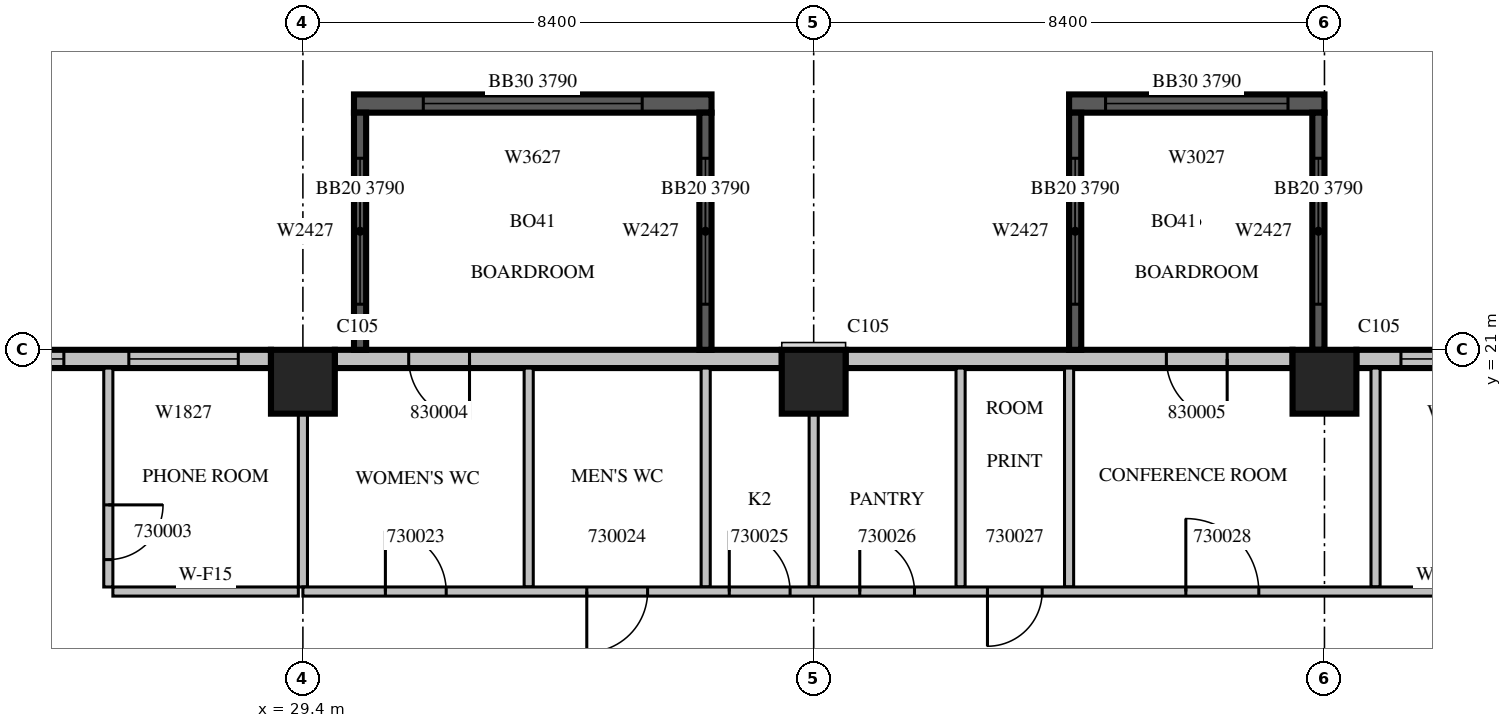
"""IFC4 building model, lengths in metres.
Left out: names, types, materials, properties, quantities, classifications, styles, units other than length and angle.
Written with IfcOpenShell. Run it as: python <this file> out.ifc"""

import sys

from ifc_helpers import new_model, si_unit, direction, frame, frame_2d, origin, origin_2d, place, context, subcontext, project, spatial, rectangle, extrude, source, transform, mapped, element, fill, save


model = new_model("IFC4")
c1 = context("Model", 3, precision=1e-05, world=origin(), true_north=direction((0.0, 1.0)))
c2 = subcontext(c1, "Body", "Model", "MODEL_VIEW")
j1 = project(units=[si_unit("LENGTHUNIT", "METRE"), si_unit("PLANEANGLEUNIT", "RADIAN")], contexts=[c1])
p1 = place(None, origin())
s1 = spatial("IfcSite", under=j1, at=p1, CompositionType="ELEMENT")
p2 = place(p1, origin())
s2 = spatial("IfcBuilding", under=s1, at=p2, CompositionType="ELEMENT")
p3 = place(p2, frame((0.0, 0.0, 137.1)))
s3 = spatial("IfcBuildingStorey", under=s2, at=p3, CompositionType="ELEMENT", Elevation=137.1)
m1 = source(origin(), c2, "Body", "SweptSolid", [
    extrude(rectangle(XDim=1.05, YDim=1.05, at=origin_2d()), origin(), (0.0, 0.0, 1.0), 4.2),
])
for number, where, z_axis, x_axis in (
    (1, (29.4, 20.475, 0.0), (0.0, 0.0, 1.0), (1.0, 0.0, 0.0)),
    (2, (37.8, 20.475, 0.0), (0.0, 0.0, 1.0), (1.0, 0.0, 0.0)),
    (3, (46.2, 20.475, 0.0), (0.0, 0.0, 1.0), (1.0, 0.0, 0.0)),
):
    element("IfcColumn", number, at=place(p3, frame(where, z_axis=z_axis, x_axis=x_axis)), inside=s3, PredefinedType="COLUMN", context=c2, shape_type="MappedRepresentation", body=[
        mapped(m1, transform((0.0, 0.0, 0.0), scale=1.0)),
    ])
m2 = source(origin(), c2, "Body", "SweptSolid", [
    extrude(rectangle(XDim=4.83, YDim=0.3, at=frame_2d((2.415, 0.0))), origin(), (0.0, 0.0, 1.0), 3.8),
])
p4 = place(p3, frame((51.555, 20.85, 0.0), z_axis=(0.0, 0.0, 1.0), x_axis=(-1.0, 0.0, 0.0)))
e4 = element("IfcWall", 4, at=p4, inside=s3, PredefinedType="STANDARD", context=c2, shape_type="MappedRepresentation", body=[
    mapped(m2, transform((0.0, 0.0, 0.0), scale=1.0)),
])
m3 = source(origin(), c2, "Body", "SweptSolid", [
    extrude(rectangle(XDim=1.8, YDim=2.7, at=frame_2d((0.9, 1.35))), frame((0.0, 0.16, 0.0), z_axis=(0.0, -1.0, 0.0), x_axis=(1.0, 0.0, 0.0)), (0.0, 0.0, 1.0), 0.32),
])
p5 = place(p4, frame((2.297, 0.0, 0.6)))
e5 = element("IfcOpeningElement", 5, at=p5, cuts=e4, PredefinedType="OPENING", context=c2, shape_type="MappedRepresentation", body=[
    mapped(m3, transform((0.0, 0.0, 0.0), scale=1.0)),
])
m4 = source(origin(), c2, "Body", "SweptSolid", [
    extrude(rectangle(XDim=7.35, YDim=0.3, at=frame_2d((3.675, 0.0))), origin(), (0.0, 0.0, 1.0), 3.8),
])
p6 = place(p3, frame((45.675, 20.85, 0.0), z_axis=(0.0, 0.0, 1.0), x_axis=(-1.0, 0.0, 0.0)))
e6 = element("IfcWall", 6, at=p6, inside=s3, PredefinedType="STANDARD", context=c2, shape_type="MappedRepresentation", body=[
    mapped(m4, transform((0.0, 0.0, 0.0), scale=1.0)),
])
m5 = source(origin(), c2, "Body", "SweptSolid", [
    extrude(rectangle(XDim=1.0, YDim=2.1, at=frame_2d((0.5, 1.05))), frame((0.0, 0.16, 0.0), z_axis=(0.0, -1.0, 0.0), x_axis=(1.0, 0.0, 0.0)), (0.0, 0.0, 1.0), 0.32),
])
p7 = place(p6, frame((1.075, 0.0, 0.0)))
e7 = element("IfcOpeningElement", 7, at=p7, cuts=e6, PredefinedType="OPENING", context=c2, shape_type="MappedRepresentation", body=[
    mapped(m5, transform((0.0, 0.0, 0.0), scale=1.0)),
])
p8 = place(p3, frame((37.275, 20.85, 0.0), z_axis=(0.0, 0.0, 1.0), x_axis=(-1.0, 0.0, 0.0)))
e8 = element("IfcWall", 8, at=p8, inside=s3, PredefinedType="STANDARD", context=c2, shape_type="MappedRepresentation", body=[
    mapped(m4, transform((0.0, 0.0, 0.0), scale=1.0)),
])
p9 = place(p8, frame((5.135, 0.0, 0.0)))
e9 = element("IfcOpeningElement", 9, at=p9, cuts=e8, PredefinedType="OPENING", context=c2, shape_type="MappedRepresentation", body=[
    mapped(m5, transform((0.0, 0.0, 0.0), scale=1.0)),
])
m6 = source(origin(), c2, "Body", "SweptSolid", [
    extrude(rectangle(XDim=6.875, YDim=0.3, at=frame_2d((3.438, 0.0))), origin(), (0.0, 0.0, 1.0), 3.8),
])
p10 = place(p3, frame((28.875, 20.85, 0.0), z_axis=(0.0, 0.0, 1.0), x_axis=(-1.0, 0.0, 0.0)))
e10 = element("IfcWall", 10, at=p10, inside=s3, PredefinedType="STANDARD", context=c2, shape_type="MappedRepresentation", body=[
    mapped(m6, transform((0.0, 0.0, 0.0), scale=1.0)),
])
p11 = place(p10, frame((0.537, 0.0, 0.6)))
e11 = element("IfcOpeningElement", 11, at=p11, cuts=e10, PredefinedType="OPENING", context=c2, shape_type="MappedRepresentation", body=[
    mapped(m3, transform((0.0, 0.0, 0.0), scale=1.0)),
])
m7 = source(origin(), c2, "Body", "SweptSolid", [
    extrude(rectangle(XDim=2.4, YDim=2.7, at=frame_2d((1.2, 1.35))), frame((0.0, 0.16, 0.0), z_axis=(0.0, -1.0, 0.0), x_axis=(1.0, 0.0, 0.0)), (0.0, 0.0, 1.0), 0.32),
])
p12 = place(p10, frame((3.406, 0.0, 0.6)))
e12 = element("IfcOpeningElement", 12, at=p12, cuts=e10, PredefinedType="OPENING", context=c2, shape_type="MappedRepresentation", body=[
    mapped(m7, transform((0.0, 0.0, 0.0), scale=1.0)),
])
m8 = source(origin(), c2, "Body", "SweptSolid", [
    extrude(rectangle(XDim=5.88, YDim=0.3, at=frame_2d((2.94, 0.0))), origin(), (0.0, 0.0, 1.0), 3.79),
])
p13 = place(p3, frame((36.12, 25.05, 0.0), z_axis=(0.0, 0.0, 1.0), x_axis=(-1.0, 0.0, 0.0)))
e13 = element("IfcWall", 13, at=p13, inside=s3, PredefinedType="SOLIDWALL", context=c2, shape_type="MappedRepresentation", body=[
    mapped(m8, transform((0.0, 0.0, 0.0), scale=1.0)),
])
m9 = source(origin(), c2, "Body", "SweptSolid", [
    extrude(rectangle(XDim=3.6, YDim=2.7, at=frame_2d((1.8, 1.35))), frame((0.0, 0.16, 0.0), z_axis=(0.0, -1.0, 0.0), x_axis=(1.0, 0.0, 0.0)), (0.0, 0.0, 1.0), 0.32),
])
p14 = place(p13, frame((1.14, 0.0, 0.6)))
e14 = element("IfcOpeningElement", 14, at=p14, cuts=e13, PredefinedType="OPENING", context=c2, shape_type="MappedRepresentation", body=[
    mapped(m9, transform((0.0, 0.0, 0.0), scale=1.0)),
])
m10 = source(origin(), c2, "Body", "SweptSolid", [
    extrude(rectangle(XDim=3.9, YDim=0.2, at=frame_2d((1.95, 0.0))), origin(), (0.0, 0.0, 1.0), 3.79),
])
p15 = place(p3, frame((36.02, 21.0, 0.0), z_axis=(0.0, 0.0, 1.0), x_axis=(0.0, 1.0, 0.0)))
e15 = element("IfcWall", 15, at=p15, inside=s3, PredefinedType="SOLIDWALL", context=c2, shape_type="MappedRepresentation", body=[
    mapped(m10, transform((0.0, 0.0, 0.0), scale=1.0)),
])
m11 = source(origin(), c2, "Body", "SweptSolid", [
    extrude(rectangle(XDim=2.4, YDim=2.7, at=frame_2d((1.2, 1.35))), frame((0.0, 0.11, 0.0), z_axis=(0.0, -1.0, 0.0), x_axis=(1.0, 0.0, 0.0)), (0.0, 0.0, 1.0), 0.22),
])
p16 = place(p15, frame((0.75, 0.0, 0.6)))
e16 = element("IfcOpeningElement", 16, at=p16, cuts=e15, PredefinedType="OPENING", context=c2, shape_type="MappedRepresentation", body=[
    mapped(m11, transform((0.0, 0.0, 0.0), scale=1.0)),
])
p17 = place(p3, frame((30.34, 21.0, 0.0), z_axis=(0.0, 0.0, 1.0), x_axis=(0.0, 1.0, 0.0)))
e17 = element("IfcWall", 17, at=p17, inside=s3, PredefinedType="SOLIDWALL", context=c2, shape_type="MappedRepresentation", body=[
    mapped(m10, transform((0.0, 0.0, 0.0), scale=1.0)),
])
p18 = place(p17, frame((0.75, 0.0, 0.6)))
e18 = element("IfcOpeningElement", 18, at=p18, cuts=e17, PredefinedType="OPENING", context=c2, shape_type="MappedRepresentation", body=[
    mapped(m11, transform((0.0, 0.0, 0.0), scale=1.0)),
])
m12 = source(origin(), c2, "Body", "SweptSolid", [
    extrude(rectangle(XDim=4.2, YDim=0.3, at=frame_2d((2.1, 0.0))), origin(), (0.0, 0.0, 1.0), 3.79),
])
p19 = place(p3, frame((46.2, 25.05, 0.0), z_axis=(0.0, 0.0, 1.0), x_axis=(-1.0, 0.0, 0.0)))
e19 = element("IfcWall", 19, at=p19, inside=s3, PredefinedType="SOLIDWALL", context=c2, shape_type="MappedRepresentation", body=[
    mapped(m12, transform((0.0, 0.0, 0.0), scale=1.0)),
])
m13 = source(origin(), c2, "Body", "SweptSolid", [
    extrude(rectangle(XDim=3.0, YDim=2.7, at=frame_2d((1.5, 1.35))), frame((0.0, 0.16, 0.0), z_axis=(0.0, -1.0, 0.0), x_axis=(1.0, 0.0, 0.0)), (0.0, 0.0, 1.0), 0.32),
])
p20 = place(p19, frame((0.6, 0.0, 0.6)))
e20 = element("IfcOpeningElement", 20, at=p20, cuts=e19, PredefinedType="OPENING", context=c2, shape_type="MappedRepresentation", body=[
    mapped(m13, transform((0.0, 0.0, 0.0), scale=1.0)),
])
p21 = place(p3, frame((46.1, 21.0, 0.0), z_axis=(0.0, 0.0, 1.0), x_axis=(0.0, 1.0, 0.0)))
e21 = element("IfcWall", 21, at=p21, inside=s3, PredefinedType="SOLIDWALL", context=c2, shape_type="MappedRepresentation", body=[
    mapped(m10, transform((0.0, 0.0, 0.0), scale=1.0)),
])
p22 = place(p21, frame((0.75, 0.0, 0.6)))
e22 = element("IfcOpeningElement", 22, at=p22, cuts=e21, PredefinedType="OPENING", context=c2, shape_type="MappedRepresentation", body=[
    mapped(m11, transform((0.0, 0.0, 0.0), scale=1.0)),
])
p23 = place(p3, frame((42.1, 21.0, 0.0), z_axis=(0.0, 0.0, 1.0), x_axis=(0.0, 1.0, 0.0)))
e23 = element("IfcWall", 23, at=p23, inside=s3, PredefinedType="SOLIDWALL", context=c2, shape_type="MappedRepresentation", body=[
    mapped(m10, transform((0.0, 0.0, 0.0), scale=1.0)),
])
p24 = place(p23, frame((0.75, 0.0, 0.6)))
e24 = element("IfcOpeningElement", 24, at=p24, cuts=e23, PredefinedType="OPENING", context=c2, shape_type="MappedRepresentation", body=[
    mapped(m11, transform((0.0, 0.0, 0.0), scale=1.0)),
])
m14 = source(origin(), c2, "Body", "SweptSolid", [
    extrude(rectangle(XDim=3.6, YDim=0.15, at=frame_2d((1.8, 0.0))), origin(), (0.0, 0.0, 1.0), 3.8),
])
p25 = place(p3, frame((26.2, 20.7, 0.0), z_axis=(0.0, 0.0, 1.0), x_axis=(0.0, -1.0, 0.0)))
e25 = element("IfcWall", 25, at=p25, inside=s3, PredefinedType="PARTITIONING", context=c2, shape_type="MappedRepresentation", body=[
    mapped(m14, transform((0.0, 0.0, 0.0), scale=1.0)),
])
m15 = source(origin(), c2, "Body", "SweptSolid", [
    extrude(rectangle(XDim=0.9, YDim=2.1, at=frame_2d((0.45, 1.05))), frame((0.0, 0.085, 0.0), z_axis=(0.0, -1.0, 0.0), x_axis=(1.0, 0.0, 0.0)), (0.0, 0.0, 1.0), 0.17),
])
p26 = place(p25, frame((2.25, 0.0, 0.0)))
e26 = element("IfcOpeningElement", 26, at=p26, cuts=e25, PredefinedType="OPENING", context=c2, shape_type="MappedRepresentation", body=[
    mapped(m15, transform((0.0, 0.0, 0.0), scale=1.0)),
])
m16 = source(origin(), c2, "Body", "SweptSolid", [
    extrude(rectangle(XDim=3.05, YDim=0.15, at=frame_2d((1.525, 0.0))), origin(), (0.0, 0.0, 1.0), 3.8),
])
p27 = place(p3, frame((26.275, 17.025, 0.0), z_axis=(0.0, 0.0, 1.0), x_axis=(1.0, 0.0, 0.0)))
e27 = element("IfcWall", 27, at=p27, inside=s3, PredefinedType="PARTITIONING", context=c2, shape_type="MappedRepresentation", body=[
    mapped(m16, transform((0.0, 0.0, 0.0), scale=1.0)),
])
m17 = source(origin(), c2, "Body", "SweptSolid", [
    extrude(rectangle(XDim=2.851, YDim=0.15, at=frame_2d((1.425, 0.0))), origin(), (0.0, 0.0, 1.0), 3.8),
])
p28 = place(p3, frame((29.4, 17.1, 0.0), z_axis=(0.0, 0.0, 1.0), x_axis=(0.0, 1.0, 0.0)))
e28 = element("IfcWall", 28, at=p28, inside=s3, PredefinedType="PARTITIONING", context=c2, shape_type="MappedRepresentation", body=[
    mapped(m17, transform((0.0, 0.0, 0.0), scale=1.0)),
])
for number, where, z_axis, x_axis in (
    (29, (33.113, 20.7, 0.0), (0.0, 0.0, 1.0), (0.0, -1.0, 0.0)),
    (30, (36.024, 20.7, 0.0), (0.0, 0.0, 1.0), (0.0, -1.0, 0.0)),
    (31, (40.216, 20.7, 0.0), (0.0, 0.0, 1.0), (0.0, -1.0, 0.0)),
    (32, (47.04, 20.7, 0.0), (0.0, 0.0, 1.0), (0.0, -1.0, 0.0)),
):
    element("IfcWall", number, at=place(p3, frame(where, z_axis=z_axis, x_axis=x_axis)), inside=s3, PredefinedType="PARTITIONING", context=c2, shape_type="MappedRepresentation", body=[
        mapped(m14, transform((0.0, 0.0, 0.0), scale=1.0)),
    ])
p29 = place(p3, frame((37.8, 17.1, 0.0), z_axis=(0.0, 0.0, 1.0), x_axis=(0.0, 1.0, 0.0)))
e33 = element("IfcWall", 33, at=p29, inside=s3, PredefinedType="PARTITIONING", context=c2, shape_type="MappedRepresentation", body=[
    mapped(m17, transform((0.0, 0.0, 0.0), scale=1.0)),
])
p30 = place(p3, frame((42.0, 17.1, 0.0), z_axis=(0.0, 0.0, 1.0), x_axis=(0.0, 1.0, 0.0)))
e34 = element("IfcWall", 34, at=p30, inside=s3, PredefinedType="PARTITIONING", context=c2, shape_type="MappedRepresentation", body=[
    mapped(m14, transform((0.0, 0.0, 0.0), scale=1.0)),
])
m18 = source(origin(), c2, "Body", "SweptSolid", [
    extrude(rectangle(XDim=37.5, YDim=0.15, at=frame_2d((18.75, 0.0))), origin(), (0.0, 0.0, 1.0), 3.8),
])
p31 = place(p3, frame((29.4, 17.025, 0.0), z_axis=(0.0, 0.0, 1.0), x_axis=(1.0, 0.0, 0.0)))
e35 = element("IfcWall", 35, at=p31, inside=s3, PredefinedType="PARTITIONING", context=c2, shape_type="MappedRepresentation", body=[
    mapped(m18, transform((0.0, 0.0, 0.0), scale=1.0)),
])
m19 = source(origin(), c2, "Body", "SweptSolid", [
    extrude(rectangle(XDim=1.0, YDim=2.1, at=frame_2d((0.5, 1.05))), frame((0.0, 0.085, 0.0), z_axis=(0.0, -1.0, 0.0), x_axis=(1.0, 0.0, 0.0)), (0.0, 0.0, 1.0), 0.17),
])
p32 = place(p31, frame((1.357, 0.0, 0.0)))
e36 = element("IfcOpeningElement", 36, at=p32, cuts=e35, PredefinedType="OPENING", context=c2, shape_type="MappedRepresentation", body=[
    mapped(m19, transform((0.0, 0.0, 0.0), scale=1.0)),
])
p33 = place(p31, frame((4.669, 0.0, 0.0)))
e37 = element("IfcOpeningElement", 37, at=p33, cuts=e35, PredefinedType="OPENING", context=c2, shape_type="MappedRepresentation", body=[
    mapped(m19, transform((0.0, 0.0, 0.0), scale=1.0)),
])
p34 = place(p31, frame((7.012, 0.0, 0.0)))
e38 = element("IfcOpeningElement", 38, at=p34, cuts=e35, PredefinedType="OPENING", context=c2, shape_type="MappedRepresentation", body=[
    mapped(m19, transform((0.0, 0.0, 0.0), scale=1.0)),
])
p35 = place(p31, frame((9.158, 0.0, 0.0)))
e39 = element("IfcOpeningElement", 39, at=p35, cuts=e35, PredefinedType="OPENING", context=c2, shape_type="MappedRepresentation", body=[
    mapped(m15, transform((0.0, 0.0, 0.0), scale=1.0)),
])
p36 = place(p31, frame((11.258, 0.0, 0.0)))
e40 = element("IfcOpeningElement", 40, at=p36, cuts=e35, PredefinedType="OPENING", context=c2, shape_type="MappedRepresentation", body=[
    mapped(m15, transform((0.0, 0.0, 0.0), scale=1.0)),
])
m20 = source(origin(), c2, "Body", "SweptSolid", [
    extrude(rectangle(XDim=1.2, YDim=2.1, at=frame_2d((0.6, 1.05))), frame((0.0, 0.085, 0.0), z_axis=(0.0, -1.0, 0.0), x_axis=(1.0, 0.0, 0.0)), (0.0, 0.0, 1.0), 0.17),
])
p37 = place(p31, frame((14.52, 0.0, 0.0)))
e41 = element("IfcOpeningElement", 41, at=p37, cuts=e35, PredefinedType="OPENING", context=c2, shape_type="MappedRepresentation", body=[
    mapped(m20, transform((0.0, 0.0, 0.0), scale=1.0)),
])
p38 = place(p31, frame((19.56, 0.0, 0.0)))
e42 = element("IfcOpeningElement", 42, at=p38, cuts=e35, PredefinedType="OPENING", context=c2, shape_type="MappedRepresentation", body=[
    mapped(m20, transform((0.0, 0.0, 0.0), scale=1.0)),
])
p39 = place(p31, frame((25.804, 0.0, 0.0)))
e43 = element("IfcOpeningElement", 43, at=p39, cuts=e35, PredefinedType="OPENING", context=c2, shape_type="MappedRepresentation", body=[
    mapped(m20, transform((0.0, 0.0, 0.0), scale=1.0)),
])
p40 = place(p31, frame((33.251, 0.0, 0.0)))
e44 = element("IfcOpeningElement", 44, at=p40, cuts=e35, PredefinedType="OPENING", context=c2, shape_type="MappedRepresentation", body=[
    mapped(m20, transform((0.0, 0.0, 0.0), scale=1.0)),
])
m21 = source(origin(), c2, "Body", "SweptSolid", [
    extrude(rectangle(XDim=1.8, YDim=2.7, at=frame_2d((0.9, 1.35))), frame((0.0, 0.03, 0.0), z_axis=(0.0, -1.0, 0.0), x_axis=(1.0, 0.0, 0.0)), (0.0, 0.0, 1.0), 0.06),
])
p41 = place(p5, origin())
e45 = element("IfcWindow", 45, at=p41, inside=s3, PartitioningType="SINGLE_PANEL", PredefinedType="WINDOW", context=c2, shape_type="MappedRepresentation", body=[
    mapped(m21, transform((0.0, 0.0, 0.0), scale=1.0)),
])
fill(e5, e45)
p42 = place(p11, origin())
e46 = element("IfcWindow", 46, at=p42, inside=s3, PartitioningType="SINGLE_PANEL", PredefinedType="WINDOW", context=c2, shape_type="MappedRepresentation", body=[
    mapped(m21, transform((0.0, 0.0, 0.0), scale=1.0)),
])
fill(e11, e46)
m22 = source(origin(), c2, "Body", "SweptSolid", [
    extrude(rectangle(XDim=2.4, YDim=2.7, at=frame_2d((1.2, 1.35))), frame((0.0, 0.03, 0.0), z_axis=(0.0, -1.0, 0.0), x_axis=(1.0, 0.0, 0.0)), (0.0, 0.0, 1.0), 0.06),
])
p43 = place(p12, origin())
e47 = element("IfcWindow", 47, at=p43, inside=s3, PartitioningType="SINGLE_PANEL", PredefinedType="WINDOW", context=c2, shape_type="MappedRepresentation", body=[
    mapped(m22, transform((0.0, 0.0, 0.0), scale=1.0)),
])
fill(e12, e47)
m23 = source(origin(), c2, "Body", "SweptSolid", [
    extrude(rectangle(XDim=3.6, YDim=2.7, at=frame_2d((1.8, 1.35))), frame((0.0, 0.03, 0.0), z_axis=(0.0, -1.0, 0.0), x_axis=(1.0, 0.0, 0.0)), (0.0, 0.0, 1.0), 0.06),
])
p44 = place(p14, origin())
e48 = element("IfcWindow", 48, at=p44, inside=s3, PartitioningType="SINGLE_PANEL", PredefinedType="WINDOW", context=c2, shape_type="MappedRepresentation", body=[
    mapped(m23, transform((0.0, 0.0, 0.0), scale=1.0)),
])
fill(e14, e48)
p45 = place(p16, origin())
e49 = element("IfcWindow", 49, at=p45, inside=s3, PartitioningType="SINGLE_PANEL", PredefinedType="WINDOW", context=c2, shape_type="MappedRepresentation", body=[
    mapped(m22, transform((0.0, 0.0, 0.0), scale=1.0)),
])
fill(e16, e49)
p46 = place(p18, origin())
e50 = element("IfcWindow", 50, at=p46, inside=s3, PartitioningType="SINGLE_PANEL", PredefinedType="WINDOW", context=c2, shape_type="MappedRepresentation", body=[
    mapped(m22, transform((0.0, 0.0, 0.0), scale=1.0)),
])
fill(e18, e50)
m24 = source(origin(), c2, "Body", "SweptSolid", [
    extrude(rectangle(XDim=3.0, YDim=2.7, at=frame_2d((1.5, 1.35))), frame((0.0, 0.03, 0.0), z_axis=(0.0, -1.0, 0.0), x_axis=(1.0, 0.0, 0.0)), (0.0, 0.0, 1.0), 0.06),
])
p47 = place(p20, origin())
e51 = element("IfcWindow", 51, at=p47, inside=s3, PartitioningType="SINGLE_PANEL", PredefinedType="WINDOW", context=c2, shape_type="MappedRepresentation", body=[
    mapped(m24, transform((0.0, 0.0, 0.0), scale=1.0)),
])
fill(e20, e51)
p48 = place(p22, origin())
e52 = element("IfcWindow", 52, at=p48, inside=s3, PartitioningType="SINGLE_PANEL", PredefinedType="WINDOW", context=c2, shape_type="MappedRepresentation", body=[
    mapped(m22, transform((0.0, 0.0, 0.0), scale=1.0)),
])
fill(e22, e52)
p49 = place(p24, origin())
e53 = element("IfcWindow", 53, at=p49, inside=s3, PartitioningType="SINGLE_PANEL", PredefinedType="WINDOW", context=c2, shape_type="MappedRepresentation", body=[
    mapped(m22, transform((0.0, 0.0, 0.0), scale=1.0)),
])
fill(e24, e53)
m25 = source(origin(), c2, "Body", "SweptSolid", [
    extrude(rectangle(XDim=0.9, YDim=2.1, at=frame_2d((0.45, 1.05))), frame((0.0, 0.025, 0.0), z_axis=(0.0, -1.0, 0.0), x_axis=(1.0, 0.0, 0.0)), (0.0, 0.0, 1.0), 0.05),
])
p50 = place(p26, origin())
e54 = element("IfcDoor", 54, at=p50, inside=s3, OperationType="SINGLE_SWING_LEFT", PredefinedType="DOOR", context=c2, shape_type="MappedRepresentation", body=[
    mapped(m25, transform((0.0, 0.0, 0.0), scale=1.0)),
])
fill(e26, e54)
m26 = source(origin(), c2, "Body", "SweptSolid", [
    extrude(rectangle(XDim=1.0, YDim=2.1, at=frame_2d((0.5, 1.05))), frame((0.0, 0.025, 0.0), z_axis=(0.0, -1.0, 0.0), x_axis=(1.0, 0.0, 0.0)), (0.0, 0.0, 1.0), 0.05),
])
p51 = place(p32, origin())
e55 = element("IfcDoor", 55, at=p51, inside=s3, OperationType="SINGLE_SWING_LEFT", PredefinedType="DOOR", context=c2, shape_type="MappedRepresentation", body=[
    mapped(m26, transform((0.0, 0.0, 0.0), scale=1.0)),
])
fill(e36, e55)
p52 = place(p33, origin())
e56 = element("IfcDoor", 56, at=p52, inside=s3, OperationType="SINGLE_SWING_RIGHT", PredefinedType="DOOR", context=c2, shape_type="MappedRepresentation", body=[
    mapped(m26, transform((0.0, 0.0, 0.0), scale=1.0)),
])
fill(e37, e56)
p53 = place(p34, origin())
e57 = element("IfcDoor", 57, at=p53, inside=s3, OperationType="SINGLE_SWING_LEFT", PredefinedType="DOOR", context=c2, shape_type="MappedRepresentation", body=[
    mapped(m26, transform((0.0, 0.0, 0.0), scale=1.0)),
])
fill(e38, e57)
p54 = place(p35, origin())
e58 = element("IfcDoor", 58, at=p54, inside=s3, OperationType="SINGLE_SWING_LEFT", PredefinedType="DOOR", context=c2, shape_type="MappedRepresentation", body=[
    mapped(m25, transform((0.0, 0.0, 0.0), scale=1.0)),
])
fill(e39, e58)
p55 = place(p36, origin())
e59 = element("IfcDoor", 59, at=p55, inside=s3, OperationType="SINGLE_SWING_RIGHT", PredefinedType="DOOR", context=c2, shape_type="MappedRepresentation", body=[
    mapped(m25, transform((0.0, 0.0, 0.0), scale=1.0)),
])
fill(e40, e59)
m27 = source(origin(), c2, "Body", "SweptSolid", [
    extrude(rectangle(XDim=1.2, YDim=2.1, at=frame_2d((0.6, 1.05))), frame((0.0, 0.025, 0.0), z_axis=(0.0, -1.0, 0.0), x_axis=(1.0, 0.0, 0.0)), (0.0, 0.0, 1.0), 0.05),
])
p56 = place(p37, origin())
e60 = element("IfcDoor", 60, at=p56, inside=s3, OperationType="SINGLE_SWING_LEFT", PredefinedType="DOOR", context=c2, shape_type="MappedRepresentation", body=[
    mapped(m27, transform((0.0, 0.0, 0.0), scale=1.0)),
])
fill(e41, e60)
p57 = place(p9, origin())
e61 = element("IfcDoor", 61, at=p57, inside=s3, OperationType="SINGLE_SWING_LEFT", PredefinedType="DOOR", context=c2, shape_type="MappedRepresentation", body=[
    mapped(m26, transform((0.0, 0.0, 0.0), scale=1.0)),
])
fill(e9, e61)
p58 = place(p7, origin())
e62 = element("IfcDoor", 62, at=p58, inside=s3, OperationType="SINGLE_SWING_LEFT", PredefinedType="DOOR", context=c2, shape_type="MappedRepresentation", body=[
    mapped(m26, transform((0.0, 0.0, 0.0), scale=1.0)),
])
fill(e7, e62)
save(model, sys.argv[1])
